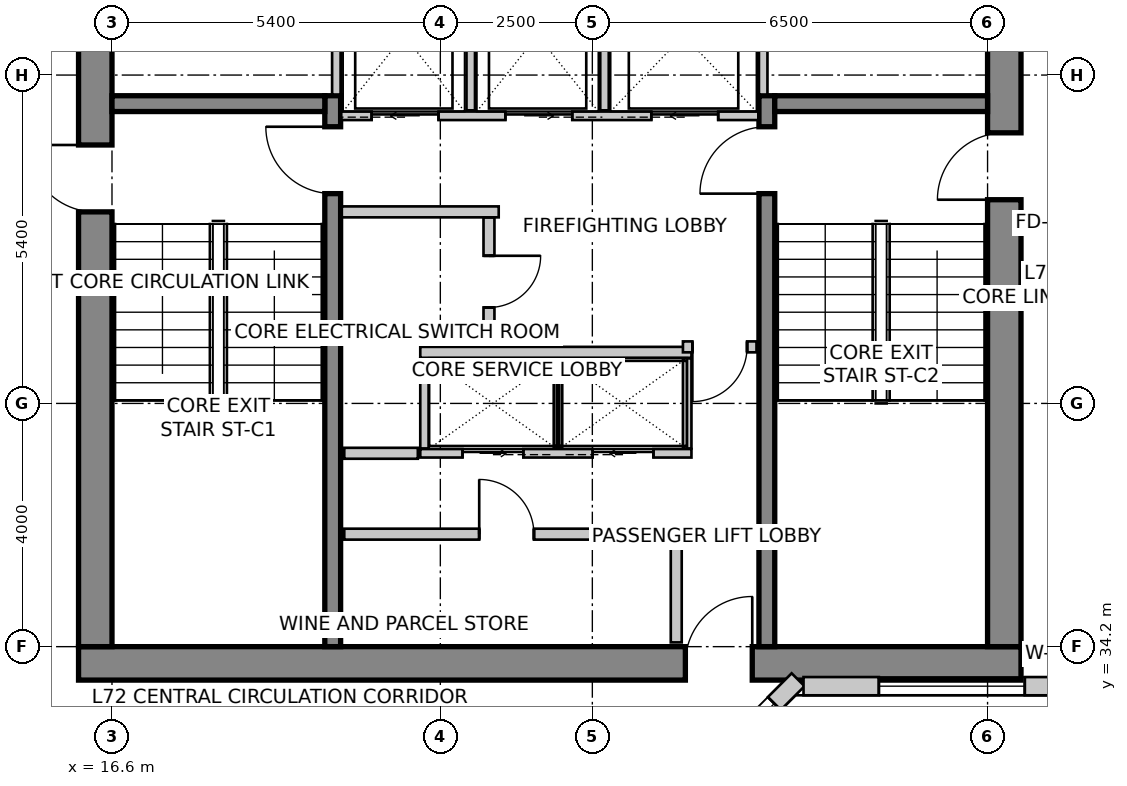
"""IFC4 building model, lengths in metres.
Left out: names, types, materials, properties, quantities, classifications, styles, units other than length and angle.
Written with IfcOpenShell. Run it as: python <this file> out.ifc"""

import sys

from ifc_helpers import new_model, si_unit, direction, frame, frame_2d, origin, place, context, subcontext, project, spatial, rectangle, extrude, source, transform, mapped, element, fill, save


model = new_model("IFC4")
c1 = context("Model", 3, precision=1e-05, world=origin(), true_north=direction((0.0, 1.0)))
c2 = subcontext(c1, "Body", "Model", "MODEL_VIEW")
j1 = project(units=[si_unit("LENGTHUNIT", "METRE"), si_unit("PLANEANGLEUNIT", "RADIAN")], contexts=[c1])
p1 = place(None, origin())
s1 = spatial("IfcSite", under=j1, at=p1, CompositionType="ELEMENT")
p2 = place(p1, origin())
s2 = spatial("IfcBuilding", under=s1, at=p2, CompositionType="ELEMENT")
p3 = place(p2, frame((0.0, 0.0, 281.7)))
s3 = spatial("IfcBuildingStorey", under=s2, at=p3, CompositionType="ELEMENT", Elevation=281.7)
p4 = place(p3, frame((16.05, 33.925, 0.0), z_axis=(0.0, 0.0, 1.0), x_axis=(1.0, 0.0, 0.0)))
e1 = element("IfcWall", 1, at=p4, inside=s3, PredefinedType="SHEAR", context=c2, shape_type="SweptSolid", body=[
    extrude(rectangle(XDim=15.5, YDim=0.55, at=frame_2d((7.75, 0.0))), origin(), (0.0, 0.0, 1.0), 3.6),
])
m1 = source(origin(), c2, "Body", "SweptSolid", [
    extrude(rectangle(XDim=1.1, YDim=2.15, at=frame_2d((0.55, 1.075))), frame((0.0, 0.285, 0.0), z_axis=(0.0, -1.0, 0.0), x_axis=(1.0, 0.0, 0.0)), (0.0, 0.0, 1.0), 0.57),
])
p5 = place(p4, frame((9.98, 0.0, 0.0)))
e2 = element("IfcOpeningElement", 2, at=p5, cuts=e1, PredefinedType="OPENING", context=c2, shape_type="MappedRepresentation", body=[
    mapped(m1, transform((0.0, 0.0, 0.0), scale=1.0)),
])
p6 = place(p3, frame((16.325, 34.2, 0.0), z_axis=(0.0, 0.0, 1.0), x_axis=(0.0, 1.0, 0.0)))
e3 = element("IfcWall", 3, at=p6, inside=s3, PredefinedType="SHEAR", context=c2, shape_type="SweptSolid", body=[
    extrude(rectangle(XDim=11.4, YDim=0.55, at=frame_2d((5.7, 0.0))), origin(), (0.0, 0.0, 1.0), 3.6),
])
p7 = place(p6, frame((7.15, 0.0, 0.0)))
e4 = element("IfcOpeningElement", 4, at=p7, cuts=e3, PredefinedType="OPENING", context=c2, shape_type="MappedRepresentation", body=[
    mapped(m1, transform((0.0, 0.0, 0.0), scale=1.0)),
])
p8 = place(p3, frame((31.275, 34.2, 0.0), z_axis=(0.0, 0.0, 1.0), x_axis=(0.0, 1.0, 0.0)))
e5 = element("IfcWall", 5, at=p8, inside=s3, PredefinedType="SHEAR", context=c2, shape_type="SweptSolid", body=[
    extrude(rectangle(XDim=11.4, YDim=0.55, at=frame_2d((5.7, 0.0))), origin(), (0.0, 0.0, 1.0), 3.6),
])
p9 = place(p8, frame((7.35, 0.0, 0.0)))
e6 = element("IfcOpeningElement", 6, at=p9, cuts=e5, PredefinedType="OPENING", context=c2, shape_type="MappedRepresentation", body=[
    mapped(m1, transform((0.0, 0.0, 0.0), scale=1.0)),
])
p10 = place(p3, frame((20.23, 34.2, 0.0), z_axis=(0.0, 0.0, 1.0), x_axis=(0.0, 1.0, 0.0)))
e7 = element("IfcWall", 7, at=p10, inside=s3, PredefinedType="SHEAR", context=c2, shape_type="SweptSolid", body=[
    extrude(rectangle(XDim=9.06, YDim=0.26, at=frame_2d((4.53, 0.0))), origin(), (0.0, 0.0, 1.0), 3.6),
])
m2 = source(origin(), c2, "Body", "SweptSolid", [
    extrude(rectangle(XDim=1.1, YDim=2.15, at=frame_2d((0.55, 1.075))), frame((0.0, 0.14, 0.0), z_axis=(0.0, -1.0, 0.0), x_axis=(1.0, 0.0, 0.0)), (0.0, 0.0, 1.0), 0.28),
])
p11 = place(p10, frame((7.45, 0.0, 0.0)))
e8 = element("IfcOpeningElement", 8, at=p11, cuts=e7, PredefinedType="OPENING", context=c2, shape_type="MappedRepresentation", body=[
    mapped(m2, transform((0.0, 0.0, 0.0), scale=1.0)),
])
p12 = place(p3, frame((27.37, 34.2, 0.0), z_axis=(0.0, 0.0, 1.0), x_axis=(0.0, 1.0, 0.0)))
e9 = element("IfcWall", 9, at=p12, inside=s3, PredefinedType="SHEAR", context=c2, shape_type="SweptSolid", body=[
    extrude(rectangle(XDim=9.06, YDim=0.26, at=frame_2d((4.53, 0.0))), origin(), (0.0, 0.0, 1.0), 3.6),
])
p13 = place(p12, frame((7.45, 0.0, 0.0)))
e10 = element("IfcOpeningElement", 10, at=p13, cuts=e9, PredefinedType="OPENING", context=c2, shape_type="MappedRepresentation", body=[
    mapped(m2, transform((0.0, 0.0, 0.0), scale=1.0)),
])
for number, where, z_axis, x_axis in (
    (11, (16.6, 43.13, 0.0), (0.0, 0.0, 1.0), (1.0, 0.0, 0.0)),
    (12, (27.5, 43.13, 0.0), (0.0, 0.0, 1.0), (1.0, 0.0, 0.0)),
):
    element("IfcWall", number, at=place(p3, frame(where, z_axis=z_axis, x_axis=x_axis)), inside=s3, PredefinedType="SHEAR", context=c2, shape_type="SweptSolid", body=[
        extrude(rectangle(XDim=3.5, YDim=0.26, at=frame_2d((1.75, 0.0))), origin(), (0.0, 0.0, 1.0), 3.6),
    ])
p14 = place(p3, frame((25.828, 31.6, 0.0), z_axis=(0.0, 0.0, 1.0), x_axis=(0.707106781187, 0.707106781187, 0.0)))
e13 = element("IfcWall", 13, at=p14, inside=s3, PredefinedType="SOLIDWALL", context=c2, shape_type="SweptSolid", body=[
    extrude(rectangle(XDim=2.907, YDim=0.3, at=frame_2d((1.454, 0.0))), origin(), (0.0, 0.0, 1.0), 3.35),
])
m3 = source(origin(), c2, "Body", "SweptSolid", [
    extrude(rectangle(XDim=1.8, YDim=2.1, at=frame_2d((0.9, 1.05))), frame((0.0, 0.16, 0.0), z_axis=(0.0, -1.0, 0.0), x_axis=(1.0, 0.0, 0.0)), (0.0, 0.0, 1.0), 0.32),
])
p15 = place(p14, frame((0.554, 0.0, 0.85)))
e14 = element("IfcOpeningElement", 14, at=p15, cuts=e13, PredefinedType="OPENING", context=c2, shape_type="MappedRepresentation", body=[
    mapped(m3, transform((0.0, 0.0, 0.0), scale=1.0)),
])
p16 = place(p3, frame((27.973, 33.55, 0.0), z_axis=(0.0, 0.0, 1.0), x_axis=(1.0, 0.0, 0.0)))
e15 = element("IfcWall", 15, at=p16, inside=s3, PredefinedType="SOLIDWALL", context=c2, shape_type="SweptSolid", body=[
    extrude(rectangle(XDim=9.115, YDim=0.3, at=frame_2d((4.558, 0.0))), origin(), (0.0, 0.0, 1.0), 3.35),
])
m4 = source(origin(), c2, "Body", "SweptSolid", [
    extrude(rectangle(XDim=2.4, YDim=2.2, at=frame_2d((1.2, 1.1))), frame((0.0, 0.16, 0.0), z_axis=(0.0, -1.0, 0.0), x_axis=(1.0, 0.0, 0.0)), (0.0, 0.0, 1.0), 0.32),
])
p17 = place(p16, frame((1.239, 0.0, 0.85)))
e16 = element("IfcOpeningElement", 16, at=p17, cuts=e15, PredefinedType="OPENING", context=c2, shape_type="MappedRepresentation", body=[
    mapped(m4, transform((0.0, 0.0, 0.0), scale=1.0)),
])
m5 = source(origin(), c2, "Body", "SweptSolid", [
    extrude(rectangle(XDim=2.1, YDim=2.0, at=frame_2d((1.05, 1.0))), frame((0.0, 0.16, 0.0), z_axis=(0.0, -1.0, 0.0), x_axis=(1.0, 0.0, 0.0)), (0.0, 0.0, 1.0), 0.32),
])
p18 = place(p16, frame((5.626, 0.0, 0.85)))
e17 = element("IfcOpeningElement", 17, at=p18, cuts=e15, PredefinedType="OPENING", context=c2, shape_type="MappedRepresentation", body=[
    mapped(m5, transform((0.0, 0.0, 0.0), scale=1.0)),
])
p19 = place(p3, frame((20.37, 42.93, 0.0), z_axis=(0.0, 0.0, 1.0), x_axis=(1.0, 0.0, 0.0)))
e18 = element("IfcWall", 18, at=p19, inside=s3, PredefinedType="SOLIDWALL", context=c2, shape_type="SweptSolid", body=[
    extrude(rectangle(XDim=6.86, YDim=0.14, at=frame_2d((3.43, 0.0))), origin(), (0.0, 0.0, 1.0), 3.35),
])
m6 = source(origin(), c2, "Body", "SweptSolid", [
    extrude(rectangle(XDim=1.1, YDim=2.15, at=frame_2d((0.55, 1.075))), frame((0.0, 0.08, 0.0), z_axis=(0.0, -1.0, 0.0), x_axis=(1.0, 0.0, 0.0)), (0.0, 0.0, 1.0), 0.16),
])
p20 = place(p19, frame((0.5, 0.0, 0.0)))
e19 = element("IfcOpeningElement", 19, at=p20, cuts=e18, PredefinedType="OPENING", context=c2, shape_type="MappedRepresentation", body=[
    mapped(m6, transform((0.0, 0.0, 0.0), scale=1.0)),
])
p21 = place(p19, frame((2.7, 0.0, 0.0)))
e20 = element("IfcOpeningElement", 20, at=p21, cuts=e18, PredefinedType="OPENING", context=c2, shape_type="MappedRepresentation", body=[
    mapped(m6, transform((0.0, 0.0, 0.0), scale=1.0)),
])
p22 = place(p19, frame((5.1, 0.0, 0.0)))
e21 = element("IfcOpeningElement", 21, at=p22, cuts=e18, PredefinedType="OPENING", context=c2, shape_type="MappedRepresentation", body=[
    mapped(m6, transform((0.0, 0.0, 0.0), scale=1.0)),
])
for number, where, z_axis, x_axis in (
    (22, (20.29, 43.28, 0.0), (0.0, 0.0, 1.0), (0.0, 1.0, 0.0)),
    (23, (27.31, 43.28, 0.0), (0.0, 0.0, 1.0), (0.0, 1.0, 0.0)),
):
    element("IfcWall", number, at=place(p3, frame(where, z_axis=z_axis, x_axis=x_axis)), inside=s3, PredefinedType="SOLIDWALL", context=c2, shape_type="SweptSolid", body=[
        extrude(rectangle(XDim=2.3, YDim=0.14, at=frame_2d((1.15, 0.0))), origin(), (0.0, 0.0, 1.0), 3.35),
    ])
for number, where, z_axis, x_axis in (
    (24, (22.5, 43.02, 0.0), (0.0, 0.0, 1.0), (0.0, 1.0, 0.0)),
    (25, (24.7, 43.02, 0.0), (0.0, 0.0, 1.0), (0.0, 1.0, 0.0)),
):
    element("IfcWall", number, at=place(p3, frame(where, z_axis=z_axis, x_axis=x_axis)), inside=s3, PredefinedType="SOLIDWALL", context=c2, shape_type="SweptSolid", body=[
        extrude(rectangle(XDim=2.56, YDim=0.14, at=frame_2d((1.28, 0.0))), origin(), (0.0, 0.0, 1.0), 3.35),
    ])
p23 = place(p3, frame((21.67, 37.38, 0.0), z_axis=(0.0, 0.0, 1.0), x_axis=(1.0, 0.0, 0.0)))
e26 = element("IfcWall", 26, at=p23, inside=s3, PredefinedType="SOLIDWALL", context=c2, shape_type="SweptSolid", body=[
    extrude(rectangle(XDim=4.46, YDim=0.14, at=frame_2d((2.23, 0.0))), origin(), (0.0, 0.0, 1.0), 3.35),
])
m7 = source(origin(), c2, "Body", "SweptSolid", [
    extrude(rectangle(XDim=1.0, YDim=2.15, at=frame_2d((0.5, 1.075))), frame((0.0, 0.08, 0.0), z_axis=(0.0, -1.0, 0.0), x_axis=(1.0, 0.0, 0.0)), (0.0, 0.0, 1.0), 0.16),
])
p24 = place(p23, frame((0.695, 0.0, 0.0)))
e27 = element("IfcOpeningElement", 27, at=p24, cuts=e26, PredefinedType="OPENING", context=c2, shape_type="MappedRepresentation", body=[
    mapped(m7, transform((0.0, 0.0, 0.0), scale=1.0)),
])
p25 = place(p23, frame((2.835, 0.0, 0.0)))
e28 = element("IfcOpeningElement", 28, at=p25, cuts=e26, PredefinedType="OPENING", context=c2, shape_type="MappedRepresentation", body=[
    mapped(m7, transform((0.0, 0.0, 0.0), scale=1.0)),
])
p26 = place(p3, frame((21.67, 39.04, 0.0), z_axis=(0.0, 0.0, 1.0), x_axis=(1.0, 0.0, 0.0)))
e29 = element("IfcWall", 29, at=p26, inside=s3, PredefinedType="SOLIDWALL", context=c2, shape_type="SweptSolid", body=[
    extrude(rectangle(XDim=4.46, YDim=0.18, at=frame_2d((2.23, 0.0))), origin(), (0.0, 0.0, 1.0), 3.35),
])
for number, where, z_axis, x_axis in (
    (30, (26.06, 37.46, 0.0), (0.0, 0.0, 1.0), (0.0, 1.0, 0.0)),
    (31, (21.74, 37.46, 0.0), (0.0, 0.0, 1.0), (0.0, 1.0, 0.0)),
    (32, (23.935, 37.46, 0.0), (0.0, 0.0, 1.0), (0.0, 1.0, 0.0)),
):
    element("IfcWall", number, at=place(p3, frame(where, z_axis=z_axis, x_axis=x_axis)), inside=s3, PredefinedType="SOLIDWALL", context=c2, shape_type="SweptSolid", body=[
        extrude(rectangle(XDim=1.48, YDim=0.14, at=frame_2d((0.74, 0.0))), origin(), (0.0, 0.0, 1.0), 3.35),
    ])
p27 = place(p3, frame((22.96, 41.35, 0.0), z_axis=(0.0, 0.0, 1.0), x_axis=(-1.0, 0.0, 0.0)))
e33 = element("IfcWall", 33, at=p27, inside=s3, PredefinedType="PARTITIONING", context=c2, shape_type="SweptSolid", body=[
    extrude(rectangle(XDim=2.58, YDim=0.18, at=frame_2d((1.29, 0.0))), origin(), (0.0, 0.0, 1.0), 3.35),
])
p28 = place(p3, frame((22.8, 41.256, 0.0), z_axis=(0.0, 0.0, 1.0), x_axis=(0.0, -1.0, 0.0)))
e34 = element("IfcWall", 34, at=p28, inside=s3, PredefinedType="PARTITIONING", context=c2, shape_type="SweptSolid", body=[
    extrude(rectangle(XDim=2.106, YDim=0.18, at=frame_2d((1.053, 0.0))), origin(), (0.0, 0.0, 1.0), 3.35),
])
m8 = source(origin(), c2, "Body", "SweptSolid", [
    extrude(rectangle(XDim=0.85, YDim=2.15, at=frame_2d((0.425, 1.075))), frame((0.0, 0.1, 0.0), z_axis=(0.0, -1.0, 0.0), x_axis=(1.0, 0.0, 0.0)), (0.0, 0.0, 1.0), 0.2),
])
p29 = place(p28, frame((0.628, 0.0, 0.0)))
e35 = element("IfcOpeningElement", 35, at=p29, cuts=e34, PredefinedType="OPENING", context=c2, shape_type="MappedRepresentation", body=[
    mapped(m8, transform((0.0, 0.0, 0.0), scale=1.0)),
])
p30 = place(p3, frame((21.63, 37.38, 0.0), z_axis=(0.0, 0.0, 1.0), x_axis=(-1.0, 0.0, 0.0)))
e36 = element("IfcWall", 36, at=p30, inside=s3, PredefinedType="PARTITIONING", context=c2, shape_type="SweptSolid", body=[
    extrude(rectangle(XDim=1.21, YDim=0.18, at=frame_2d((0.605, 0.0))), origin(), (0.0, 0.0, 1.0), 3.35),
])
p31 = place(p3, frame((27.2, 39.13, 0.0), z_axis=(0.0, 0.0, 1.0), x_axis=(-1.0, 0.0, 0.0)))
e37 = element("IfcWall", 37, at=p31, inside=s3, PredefinedType="PARTITIONING", context=c2, shape_type="SweptSolid", body=[
    extrude(rectangle(XDim=1.21, YDim=0.18, at=frame_2d((0.605, 0.0))), origin(), (0.0, 0.0, 1.0), 3.35),
])
m9 = source(origin(), c2, "Body", "SweptSolid", [
    extrude(rectangle(XDim=0.9, YDim=2.15, at=frame_2d((0.45, 1.075))), frame((0.0, 0.1, 0.0), z_axis=(0.0, -1.0, 0.0), x_axis=(1.0, 0.0, 0.0)), (0.0, 0.0, 1.0), 0.2),
])
p32 = place(p31, frame((0.155, 0.0, 0.0)))
e38 = element("IfcOpeningElement", 38, at=p32, cuts=e37, PredefinedType="OPENING", context=c2, shape_type="MappedRepresentation", body=[
    mapped(m9, transform((0.0, 0.0, 0.0), scale=1.0)),
])
p33 = place(p3, frame((20.42, 36.05, 0.0), z_axis=(0.0, 0.0, 1.0), x_axis=(1.0, 0.0, 0.0)))
e39 = element("IfcWall", 39, at=p33, inside=s3, PredefinedType="PARTITIONING", context=c2, shape_type="SweptSolid", body=[
    extrude(rectangle(XDim=5.46, YDim=0.18, at=frame_2d((2.73, 0.0))), origin(), (0.0, 0.0, 1.0), 3.35),
])
p34 = place(p33, frame((2.219, 0.0, 0.0)))
e40 = element("IfcOpeningElement", 40, at=p34, cuts=e39, PredefinedType="OPENING", context=c2, shape_type="MappedRepresentation", body=[
    mapped(m9, transform((0.0, 0.0, 0.0), scale=1.0)),
])
p35 = place(p3, frame((25.88, 35.956, 0.0), z_axis=(0.0, 0.0, 1.0), x_axis=(0.0, -1.0, 0.0)))
e41 = element("IfcWall", 41, at=p35, inside=s3, PredefinedType="PARTITIONING", context=c2, shape_type="SweptSolid", body=[
    extrude(rectangle(XDim=1.686, YDim=0.18, at=frame_2d((0.843, 0.0))), origin(), (0.0, 0.0, 1.0), 2.642),
])
m10 = source(origin(), c2, "Body", "SweptSolid", [
    extrude(rectangle(XDim=1.8, YDim=2.1, at=frame_2d((0.9, 1.05))), frame((0.0, -0.015, 0.0), z_axis=(0.0, -1.0, 0.0), x_axis=(1.0, 0.0, 0.0)), (0.0, 0.0, 1.0), 0.06),
])
p36 = place(p15, origin())
e42 = element("IfcWindow", 42, at=p36, inside=s3, PartitioningType="SINGLE_PANEL", PredefinedType="WINDOW", context=c2, shape_type="MappedRepresentation", body=[
    mapped(m10, transform((0.0, 0.0, 0.0), scale=1.0)),
])
fill(e14, e42)
m11 = source(origin(), c2, "Body", "SweptSolid", [
    extrude(rectangle(XDim=2.4, YDim=2.2, at=frame_2d((1.2, 1.1))), frame((0.0, -0.015, 0.0), z_axis=(0.0, -1.0, 0.0), x_axis=(1.0, 0.0, 0.0)), (0.0, 0.0, 1.0), 0.06),
])
p37 = place(p17, origin())
e43 = element("IfcWindow", 43, at=p37, inside=s3, PartitioningType="SINGLE_PANEL", PredefinedType="WINDOW", context=c2, shape_type="MappedRepresentation", body=[
    mapped(m11, transform((0.0, 0.0, 0.0), scale=1.0)),
])
fill(e16, e43)
m12 = source(origin(), c2, "Body", "SweptSolid", [
    extrude(rectangle(XDim=1.1, YDim=2.15, at=frame_2d((0.55, 1.075))), frame((0.0, 0.025, 0.0), z_axis=(0.0, -1.0, 0.0), x_axis=(1.0, 0.0, 0.0)), (0.0, 0.0, 1.0), 0.05),
])
p38 = place(p20, origin())
e44 = element("IfcDoor", 44, at=p38, inside=s3, OperationType="SLIDING_TO_LEFT", PredefinedType="DOOR", context=c2, shape_type="MappedRepresentation", body=[
    mapped(m12, transform((0.0, 0.0, 0.0), scale=1.0)),
])
fill(e19, e44)
p39 = place(p21, origin())
e45 = element("IfcDoor", 45, at=p39, inside=s3, OperationType="SLIDING_TO_RIGHT", PredefinedType="DOOR", context=c2, shape_type="MappedRepresentation", body=[
    mapped(m12, transform((0.0, 0.0, 0.0), scale=1.0)),
])
fill(e20, e45)
m13 = source(origin(), c2, "Body", "SweptSolid", [
    extrude(rectangle(XDim=1.1, YDim=2.15, at=frame_2d((0.55, 1.075))), frame((0.0, 0.025, 0.0), z_axis=(0.0, -1.0, 0.0), x_axis=(1.0, 0.0, 0.0)), (0.0, 0.0, 1.0), 0.05),
])
p40 = place(p22, origin())
e46 = element("IfcDoor", 46, at=p40, inside=s3, OperationType="SLIDING_TO_LEFT", PredefinedType="DOOR", context=c2, shape_type="MappedRepresentation", body=[
    mapped(m13, transform((0.0, 0.0, 0.0), scale=1.0)),
])
fill(e21, e46)
m14 = source(origin(), c2, "Body", "SweptSolid", [
    extrude(rectangle(XDim=1.0, YDim=2.15, at=frame_2d((0.5, 1.075))), frame((0.0, 0.025, 0.0), z_axis=(0.0, -1.0, 0.0), x_axis=(1.0, 0.0, 0.0)), (0.0, 0.0, 1.0), 0.05),
])
p41 = place(p24, origin())
e47 = element("IfcDoor", 47, at=p41, inside=s3, OperationType="SLIDING_TO_RIGHT", PredefinedType="DOOR", context=c2, shape_type="MappedRepresentation", body=[
    mapped(m14, transform((0.0, 0.0, 0.0), scale=1.0)),
])
fill(e27, e47)
p42 = place(p25, origin())
e48 = element("IfcDoor", 48, at=p42, inside=s3, OperationType="SLIDING_TO_LEFT", PredefinedType="DOOR", context=c2, shape_type="MappedRepresentation", body=[
    mapped(m14, transform((0.0, 0.0, 0.0), scale=1.0)),
])
fill(e28, e48)
m15 = source(origin(), c2, "Body", "SweptSolid", [
    extrude(rectangle(XDim=1.1, YDim=2.15, at=frame_2d((0.55, 1.075))), frame((0.0, 0.025, 0.0), z_axis=(0.0, -1.0, 0.0), x_axis=(1.0, 0.0, 0.0)), (0.0, 0.0, 1.0), 0.05),
])
p43 = place(p11, origin())
e49 = element("IfcDoor", 49, at=p43, inside=s3, OperationType="SINGLE_SWING_RIGHT", PredefinedType="DOOR", context=c2, shape_type="MappedRepresentation", body=[
    mapped(m15, transform((0.0, 0.0, 0.0), scale=1.0)),
])
fill(e8, e49)
p44 = place(p13, origin())
e50 = element("IfcDoor", 50, at=p44, inside=s3, OperationType="SINGLE_SWING_LEFT", PredefinedType="DOOR", context=c2, shape_type="MappedRepresentation", body=[
    mapped(m15, transform((0.0, 0.0, 0.0), scale=1.0)),
])
fill(e10, e50)
p45 = place(p7, origin())
e51 = element("IfcDoor", 51, at=p45, inside=s3, OperationType="SINGLE_SWING_RIGHT", PredefinedType="DOOR", context=c2, shape_type="MappedRepresentation", body=[
    mapped(m15, transform((0.0, 0.0, 0.0), scale=1.0)),
])
fill(e4, e51)
p46 = place(p9, origin())
e52 = element("IfcDoor", 52, at=p46, inside=s3, OperationType="SINGLE_SWING_LEFT", PredefinedType="DOOR", context=c2, shape_type="MappedRepresentation", body=[
    mapped(m15, transform((0.0, 0.0, 0.0), scale=1.0)),
])
fill(e6, e52)
p47 = place(p5, origin())
e53 = element("IfcDoor", 53, at=p47, inside=s3, OperationType="SINGLE_SWING_RIGHT", PredefinedType="DOOR", context=c2, shape_type="MappedRepresentation", body=[
    mapped(m15, transform((0.0, 0.0, 0.0), scale=1.0)),
])
fill(e2, e53)
m16 = source(origin(), c2, "Body", "SweptSolid", [
    extrude(rectangle(XDim=0.85, YDim=2.15, at=frame_2d((0.425, 1.075))), frame((0.0, 0.025, 0.0), z_axis=(0.0, -1.0, 0.0), x_axis=(1.0, 0.0, 0.0)), (0.0, 0.0, 1.0), 0.05),
])
p48 = place(p29, origin())
e54 = element("IfcDoor", 54, at=p48, inside=s3, OperationType="SINGLE_SWING_LEFT", PredefinedType="DOOR", context=c2, shape_type="MappedRepresentation", body=[
    mapped(m16, transform((0.0, 0.0, 0.0), scale=1.0)),
])
fill(e35, e54)
m17 = source(origin(), c2, "Body", "SweptSolid", [
    extrude(rectangle(XDim=0.9, YDim=2.15, at=frame_2d((0.45, 1.075))), frame((0.0, 0.025, 0.0), z_axis=(0.0, -1.0, 0.0), x_axis=(1.0, 0.0, 0.0)), (0.0, 0.0, 1.0), 0.05),
])
p49 = place(p32, origin())
e55 = element("IfcDoor", 55, at=p49, inside=s3, OperationType="SINGLE_SWING_RIGHT", PredefinedType="DOOR", context=c2, shape_type="MappedRepresentation", body=[
    mapped(m17, transform((0.0, 0.0, 0.0), scale=1.0)),
])
fill(e38, e55)
p50 = place(p34, origin())
e56 = element("IfcDoor", 56, at=p50, inside=s3, OperationType="SINGLE_SWING_LEFT", PredefinedType="DOOR", context=c2, shape_type="MappedRepresentation", body=[
    mapped(m17, transform((0.0, 0.0, 0.0), scale=1.0)),
])
fill(e40, e56)
save(model, sys.argv[1])
